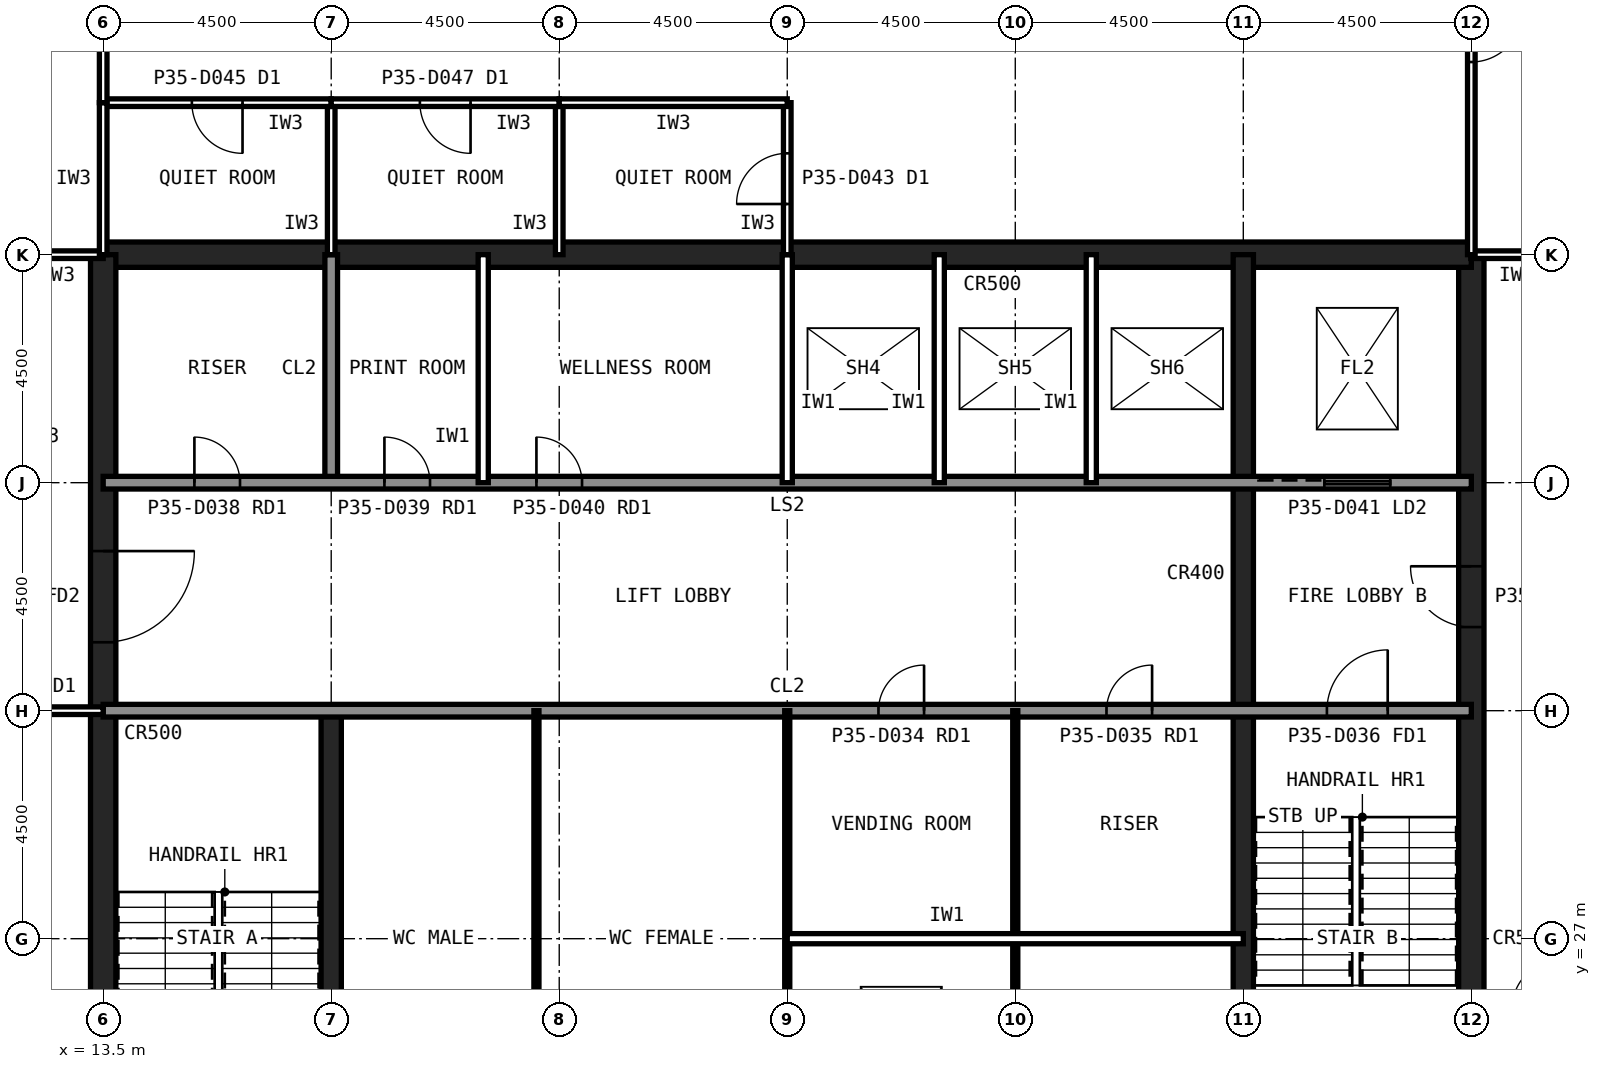
"""IFC4 building model, lengths in metres.
Left out: names, types, materials, properties, quantities, classifications, styles, units other than length and angle.
Written with IfcOpenShell. Run it as: python <this file> out.ifc"""

import sys

from ifc_helpers import new_model, si_unit, direction, frame, frame_2d, origin, place, context, subcontext, project, spatial, rectangle, extrude, element, fill, save


model = new_model("IFC4")
c1 = context("Model", 3, precision=1e-05, world=origin(), true_north=direction((0.0, 1.0)))
c2 = subcontext(c1, "Body", "Model", "MODEL_VIEW")
j1 = project(units=[si_unit("LENGTHUNIT", "METRE"), si_unit("PLANEANGLEUNIT", "RADIAN")], contexts=[c1])
p1 = place(None, origin())
s1 = spatial("IfcSite", under=j1, at=p1, CompositionType="ELEMENT")
p2 = place(p1, origin())
s2 = spatial("IfcBuilding", under=s1, at=p2, CompositionType="ELEMENT")
p3 = place(p2, frame((0.0, 0.0, 151.6)))
s3 = spatial("IfcBuildingStorey", under=s2, at=p3, CompositionType="ELEMENT", Elevation=151.6)
p4 = place(p3, frame((40.5, 13.5, 0.0), z_axis=(0.0, 0.0, 1.0), x_axis=(0.0, 1.0, 0.0)))
e1 = element("IfcWall", 1, at=p4, inside=s3, PredefinedType="SHEAR", context=c2, shape_type="SweptSolid", body=[
    extrude(rectangle(XDim=27.0, YDim=0.5, at=frame_2d((13.5, 0.0))), origin(), (0.0, 0.0, 1.0), 4.0),
])
p5 = place(p4, frame((5.85, 0.0, 0.0)))
e2 = element("IfcOpeningElement", 2, at=p5, cuts=e1, PredefinedType="OPENING", context=c2, shape_type="SweptSolid", body=[
    extrude(rectangle(XDim=1.8, YDim=2.1, at=frame_2d((0.9, 1.05))), frame((0.0, 0.26, 0.0), z_axis=(0.0, -1.0, 0.0), x_axis=(1.0, 0.0, 0.0)), (0.0, 0.0, 1.0), 0.52),
])
p6 = place(p4, frame((19.65, 0.0, 0.0)))
e3 = element("IfcOpeningElement", 3, at=p6, cuts=e1, PredefinedType="OPENING", context=c2, shape_type="SweptSolid", body=[
    extrude(rectangle(XDim=1.2, YDim=2.1, at=frame_2d((0.6, 1.05))), frame((0.0, 0.26, 0.0), z_axis=(0.0, -1.0, 0.0), x_axis=(1.0, 0.0, 0.0)), (0.0, 0.0, 1.0), 0.52),
])
p7 = place(p3, frame((40.5, 40.5, 0.0), z_axis=(0.0, 0.0, 1.0), x_axis=(-1.0, 0.0, 0.0)))
e4 = element("IfcWall", 4, at=p7, inside=s3, PredefinedType="SHEAR", context=c2, shape_type="SweptSolid", body=[
    extrude(rectangle(XDim=27.0, YDim=0.5, at=frame_2d((13.5, 0.0))), origin(), (0.0, 0.0, 1.0), 4.0),
])
p8 = place(p3, frame((13.5, 40.5, 0.0), z_axis=(0.0, 0.0, 1.0), x_axis=(0.0, -1.0, 0.0)))
e5 = element("IfcWall", 5, at=p8, inside=s3, PredefinedType="SHEAR", context=c2, shape_type="SweptSolid", body=[
    extrude(rectangle(XDim=27.0, YDim=0.5, at=frame_2d((13.5, 0.0))), origin(), (0.0, 0.0, 1.0), 4.0),
])
p9 = place(p8, frame((19.65, 0.0, 0.0)))
e6 = element("IfcOpeningElement", 6, at=p9, cuts=e5, PredefinedType="OPENING", context=c2, shape_type="SweptSolid", body=[
    extrude(rectangle(XDim=1.2, YDim=2.1, at=frame_2d((0.6, 1.05))), frame((0.0, 0.26, 0.0), z_axis=(0.0, -1.0, 0.0), x_axis=(1.0, 0.0, 0.0)), (0.0, 0.0, 1.0), 0.52),
])
p10 = place(p8, frame((5.85, 0.0, 0.0)))
e7 = element("IfcOpeningElement", 7, at=p10, cuts=e5, PredefinedType="OPENING", context=c2, shape_type="SweptSolid", body=[
    extrude(rectangle(XDim=1.8, YDim=2.1, at=frame_2d((0.9, 1.05))), frame((0.0, 0.26, 0.0), z_axis=(0.0, -1.0, 0.0), x_axis=(1.0, 0.0, 0.0)), (0.0, 0.0, 1.0), 0.52),
])
p11 = place(p3, frame((18.0, 13.5, 0.0), z_axis=(0.0, 0.0, 1.0), x_axis=(0.0, 1.0, 0.0)))
e8 = element("IfcWall", 8, at=p11, inside=s3, PredefinedType="SHEAR", context=c2, shape_type="SweptSolid", body=[
    extrude(rectangle(XDim=18.0, YDim=0.4, at=frame_2d((9.0, 0.0))), origin(), (0.0, 0.0, 1.0), 4.0),
])
p12 = place(p3, frame((18.0, 36.0, 0.0), z_axis=(0.0, 0.0, 1.0), x_axis=(0.0, 1.0, 0.0)))
e9 = element("IfcWall", 9, at=p12, inside=s3, PredefinedType="SOLIDWALL", context=c2, shape_type="SweptSolid", body=[
    extrude(rectangle(XDim=4.5, YDim=0.25, at=frame_2d((2.25, 0.0))), origin(), (0.0, 0.0, 1.0), 3.84),
])
p13 = place(p3, frame((36.0, 22.5, 0.0), z_axis=(0.0, 0.0, 1.0), x_axis=(0.0, 1.0, 0.0)))
e10 = element("IfcWall", 10, at=p13, inside=s3, PredefinedType="SHEAR", context=c2, shape_type="SweptSolid", body=[
    extrude(rectangle(XDim=18.0, YDim=0.4, at=frame_2d((9.0, 0.0))), origin(), (0.0, 0.0, 1.0), 4.0),
])
p14 = place(p3, frame((13.5, 36.0, 0.0), z_axis=(0.0, 0.0, 1.0), x_axis=(1.0, 0.0, 0.0)))
e11 = element("IfcWall", 11, at=p14, inside=s3, PredefinedType="SOLIDWALL", context=c2, shape_type="SweptSolid", body=[
    extrude(rectangle(XDim=27.0, YDim=0.25, at=frame_2d((13.5, 0.0))), origin(), (0.0, 0.0, 1.0), 3.84),
])
p15 = place(p14, frame((1.8, 0.0, 0.0)))
e12 = element("IfcOpeningElement", 12, at=p15, cuts=e11, PredefinedType="OPENING", context=c2, shape_type="SweptSolid", body=[
    extrude(rectangle(XDim=0.9, YDim=2.1, at=frame_2d((0.45, 1.05))), frame((0.0, 0.135, 0.0), z_axis=(0.0, -1.0, 0.0), x_axis=(1.0, 0.0, 0.0)), (0.0, 0.0, 1.0), 0.27),
])
p16 = place(p14, frame((5.55, 0.0, 0.0)))
e13 = element("IfcOpeningElement", 13, at=p16, cuts=e11, PredefinedType="OPENING", context=c2, shape_type="SweptSolid", body=[
    extrude(rectangle(XDim=0.9, YDim=2.1, at=frame_2d((0.45, 1.05))), frame((0.0, 0.135, 0.0), z_axis=(0.0, -1.0, 0.0), x_axis=(1.0, 0.0, 0.0)), (0.0, 0.0, 1.0), 0.27),
])
p17 = place(p14, frame((8.55, 0.0, 0.0)))
e14 = element("IfcOpeningElement", 14, at=p17, cuts=e11, PredefinedType="OPENING", context=c2, shape_type="SweptSolid", body=[
    extrude(rectangle(XDim=0.9, YDim=2.1, at=frame_2d((0.45, 1.05))), frame((0.0, 0.135, 0.0), z_axis=(0.0, -1.0, 0.0), x_axis=(1.0, 0.0, 0.0)), (0.0, 0.0, 1.0), 0.27),
])
p18 = place(p14, frame((24.1, 0.0, 0.0)))
e15 = element("IfcOpeningElement", 15, at=p18, cuts=e11, PredefinedType="OPENING", context=c2, shape_type="SweptSolid", body=[
    extrude(rectangle(XDim=1.3, YDim=2.2, at=frame_2d((0.65, 1.1))), frame((0.0, 0.135, 0.0), z_axis=(0.0, -1.0, 0.0), x_axis=(1.0, 0.0, 0.0)), (0.0, 0.0, 1.0), 0.27),
])
p19 = place(p3, frame((13.5, 31.5, 0.0), z_axis=(0.0, 0.0, 1.0), x_axis=(1.0, 0.0, 0.0)))
e16 = element("IfcWall", 16, at=p19, inside=s3, PredefinedType="SOLIDWALL", context=c2, shape_type="SweptSolid", body=[
    extrude(rectangle(XDim=27.0, YDim=0.25, at=frame_2d((13.5, 0.0))), origin(), (0.0, 0.0, 1.0), 3.84),
])
p20 = place(p19, frame((24.15, 0.0, 0.0)))
e17 = element("IfcOpeningElement", 17, at=p20, cuts=e16, PredefinedType="OPENING", context=c2, shape_type="SweptSolid", body=[
    extrude(rectangle(XDim=1.2, YDim=2.1, at=frame_2d((0.6, 1.05))), frame((0.0, 0.135, 0.0), z_axis=(0.0, -1.0, 0.0), x_axis=(1.0, 0.0, 0.0)), (0.0, 0.0, 1.0), 0.27),
])
p21 = place(p19, frame((15.3, 0.0, 0.0)))
e18 = element("IfcOpeningElement", 18, at=p21, cuts=e16, PredefinedType="OPENING", context=c2, shape_type="SweptSolid", body=[
    extrude(rectangle(XDim=0.9, YDim=2.1, at=frame_2d((0.45, 1.05))), frame((0.0, 0.135, 0.0), z_axis=(0.0, -1.0, 0.0), x_axis=(1.0, 0.0, 0.0)), (0.0, 0.0, 1.0), 0.27),
])
p22 = place(p19, frame((19.8, 0.0, 0.0)))
e19 = element("IfcOpeningElement", 19, at=p22, cuts=e16, PredefinedType="OPENING", context=c2, shape_type="SweptSolid", body=[
    extrude(rectangle(XDim=0.9, YDim=2.1, at=frame_2d((0.45, 1.05))), frame((0.0, 0.135, 0.0), z_axis=(0.0, -1.0, 0.0), x_axis=(1.0, 0.0, 0.0)), (0.0, 0.0, 1.0), 0.27),
])
for number, where, z_axis, x_axis in (
    (20, (21.0, 36.0, 0.0), (0.0, 0.0, 1.0), (0.0, 1.0, 0.0)),
    (21, (27.0, 36.0, 0.0), (0.0, 0.0, 1.0), (0.0, 1.0, 0.0)),
    (22, (30.0, 36.0, 0.0), (0.0, 0.0, 1.0), (0.0, 1.0, 0.0)),
    (23, (33.0, 36.0, 0.0), (0.0, 0.0, 1.0), (0.0, 1.0, 0.0)),
):
    element("IfcWall", number, at=place(p3, frame(where, z_axis=z_axis, x_axis=x_axis)), inside=s3, PredefinedType="PARTITIONING", context=c2, shape_type="SweptSolid", body=[
        extrude(rectangle(XDim=4.5, YDim=0.2, at=frame_2d((2.25, 0.0))), origin(), (0.0, 0.0, 1.0), 3.84),
    ])
for number, where, z_axis, x_axis in (
    (24, (22.05, 22.5, 0.0), (0.0, 0.0, 1.0), (0.0, 1.0, 0.0)),
    (25, (27.0, 22.5, 0.0), (0.0, 0.0, 1.0), (0.0, 1.0, 0.0)),
    (26, (31.5, 22.5, 0.0), (0.0, 0.0, 1.0), (0.0, 1.0, 0.0)),
):
    element("IfcWall", number, at=place(p3, frame(where, z_axis=z_axis, x_axis=x_axis)), inside=s3, PredefinedType="PLUMBINGWALL", context=c2, shape_type="SweptSolid", body=[
        extrude(rectangle(XDim=9.0, YDim=0.1, at=frame_2d((4.5, 0.0))), origin(), (0.0, 0.0, 1.0), 3.84),
    ])
p23 = place(p3, frame((27.0, 27.0, 0.0), z_axis=(0.0, 0.0, 1.0), x_axis=(1.0, 0.0, 0.0)))
e27 = element("IfcWall", 27, at=p23, inside=s3, PredefinedType="PARTITIONING", context=c2, shape_type="SweptSolid", body=[
    extrude(rectangle(XDim=9.0, YDim=0.2, at=frame_2d((4.5, 0.0))), origin(), (0.0, 0.0, 1.0), 3.84),
])
p24 = place(p3, frame((42.3, 40.5, 0.0), z_axis=(0.0, 0.0, 1.0), x_axis=(-1.0, 0.0, 0.0)))
e28 = element("IfcWall", 28, at=p24, inside=s3, PredefinedType="PARTITIONING", context=c2, shape_type="SweptSolid", body=[
    extrude(rectangle(XDim=1.81, YDim=0.15, at=frame_2d((0.905, 0.0))), origin(), (0.0, 0.0, 1.0), 2.989),
])
p25 = place(p3, frame((13.5, 40.5, 0.0), z_axis=(0.0, 0.0, 1.0), x_axis=(-1.0, 0.0, 0.0)))
e29 = element("IfcWall", 29, at=p25, inside=s3, PredefinedType="PARTITIONING", context=c2, shape_type="SweptSolid", body=[
    extrude(rectangle(XDim=1.8, YDim=0.15, at=frame_2d((0.9, 0.0))), origin(), (0.0, 0.0, 1.0), 2.989),
])
p26 = place(p3, frame((13.5, 31.5, 0.0), z_axis=(0.0, 0.0, 1.0), x_axis=(-1.0, 0.0, 0.0)))
e30 = element("IfcWall", 30, at=p26, inside=s3, PredefinedType="PARTITIONING", context=c2, shape_type="SweptSolid", body=[
    extrude(rectangle(XDim=3.6, YDim=0.15, at=frame_2d((1.8, 0.0))), origin(), (0.0, 0.0, 1.0), 2.989),
])
p27 = place(p26, frame((1.3, 0.0, 0.0)))
e31 = element("IfcOpeningElement", 31, at=p27, cuts=e30, PredefinedType="OPENING", context=c2, shape_type="SweptSolid", body=[
    extrude(rectangle(XDim=1.0, YDim=2.1, at=frame_2d((0.5, 1.05))), frame((0.0, 0.085, 0.0), z_axis=(0.0, -1.0, 0.0), x_axis=(1.0, 0.0, 0.0)), (0.0, 0.0, 1.0), 0.17),
])
p28 = place(p3, frame((18.0, 40.5, 0.0), z_axis=(0.0, 0.0, 1.0), x_axis=(0.0, 1.0, 0.0)))
e32 = element("IfcWall", 32, at=p28, inside=s3, PredefinedType="PARTITIONING", context=c2, shape_type="SweptSolid", body=[
    extrude(rectangle(XDim=3.0, YDim=0.15, at=frame_2d((1.5, 0.0))), origin(), (0.0, 0.0, 1.0), 2.989),
])
p29 = place(p3, frame((18.0, 43.5, 0.0), z_axis=(0.0, 0.0, 1.0), x_axis=(-1.0, 0.0, 0.0)))
e33 = element("IfcWall", 33, at=p29, inside=s3, PredefinedType="PARTITIONING", context=c2, shape_type="SweptSolid", body=[
    extrude(rectangle(XDim=4.5, YDim=0.15, at=frame_2d((2.25, 0.0))), origin(), (0.0, 0.0, 1.0), 3.84),
])
p30 = place(p29, frame((1.75, 0.0, 0.0)))
e34 = element("IfcOpeningElement", 34, at=p30, cuts=e33, PredefinedType="OPENING", context=c2, shape_type="SweptSolid", body=[
    extrude(rectangle(XDim=1.0, YDim=2.1, at=frame_2d((0.5, 1.05))), frame((0.0, 0.085, 0.0), z_axis=(0.0, -1.0, 0.0), x_axis=(1.0, 0.0, 0.0)), (0.0, 0.0, 1.0), 0.17),
])
for number, where, z_axis, x_axis in (
    (35, (13.5, 43.5, 0.0), (0.0, 0.0, 1.0), (0.0, -1.0, 0.0)),
    (36, (22.5, 40.5, 0.0), (0.0, 0.0, 1.0), (0.0, 1.0, 0.0)),
):
    element("IfcWall", number, at=place(p3, frame(where, z_axis=z_axis, x_axis=x_axis)), inside=s3, PredefinedType="PARTITIONING", context=c2, shape_type="SweptSolid", body=[
        extrude(rectangle(XDim=3.0, YDim=0.15, at=frame_2d((1.5, 0.0))), origin(), (0.0, 0.0, 1.0), 2.989),
    ])
p31 = place(p3, frame((22.5, 43.5, 0.0), z_axis=(0.0, 0.0, 1.0), x_axis=(-1.0, 0.0, 0.0)))
e37 = element("IfcWall", 37, at=p31, inside=s3, PredefinedType="PARTITIONING", context=c2, shape_type="SweptSolid", body=[
    extrude(rectangle(XDim=4.5, YDim=0.15, at=frame_2d((2.25, 0.0))), origin(), (0.0, 0.0, 1.0), 3.84),
])
p32 = place(p31, frame((1.75, 0.0, 0.0)))
e38 = element("IfcOpeningElement", 38, at=p32, cuts=e37, PredefinedType="OPENING", context=c2, shape_type="SweptSolid", body=[
    extrude(rectangle(XDim=1.0, YDim=2.1, at=frame_2d((0.5, 1.05))), frame((0.0, 0.085, 0.0), z_axis=(0.0, -1.0, 0.0), x_axis=(1.0, 0.0, 0.0)), (0.0, 0.0, 1.0), 0.17),
])
p33 = place(p3, frame((27.0, 40.5, 0.0), z_axis=(0.0, 0.0, 1.0), x_axis=(0.0, 1.0, 0.0)))
e39 = element("IfcWall", 39, at=p33, inside=s3, PredefinedType="PARTITIONING", context=c2, shape_type="SweptSolid", body=[
    extrude(rectangle(XDim=3.0, YDim=0.15, at=frame_2d((1.5, 0.0))), origin(), (0.0, 0.0, 1.0), 2.989),
])
p34 = place(p33, frame((1.0, 0.0, 0.0)))
e40 = element("IfcOpeningElement", 40, at=p34, cuts=e39, PredefinedType="OPENING", context=c2, shape_type="SweptSolid", body=[
    extrude(rectangle(XDim=1.0, YDim=2.1, at=frame_2d((0.5, 1.05))), frame((0.0, 0.085, 0.0), z_axis=(0.0, -1.0, 0.0), x_axis=(1.0, 0.0, 0.0)), (0.0, 0.0, 1.0), 0.17),
])
p35 = place(p3, frame((27.0, 43.5, 0.0), z_axis=(0.0, 0.0, 1.0), x_axis=(-1.0, 0.0, 0.0)))
e41 = element("IfcWall", 41, at=p35, inside=s3, PredefinedType="PARTITIONING", context=c2, shape_type="SweptSolid", body=[
    extrude(rectangle(XDim=4.5, YDim=0.15, at=frame_2d((2.25, 0.0))), origin(), (0.0, 0.0, 1.0), 3.84),
])
p36 = place(p3, frame((13.5, 43.5, 0.0), z_axis=(0.0, 0.0, 1.0), x_axis=(0.0, 1.0, 0.0)))
e42 = element("IfcWall", 42, at=p36, inside=s3, PredefinedType="PARTITIONING", context=c2, shape_type="SweptSolid", body=[
    extrude(rectangle(XDim=10.08, YDim=0.15, at=frame_2d((5.04, 0.0))), origin(), (0.0, 0.0, 1.0), 2.989),
])
p37 = place(p36, frame((4.54, 0.0, 0.0)))
e43 = element("IfcOpeningElement", 43, at=p37, cuts=e42, PredefinedType="OPENING", context=c2, shape_type="SweptSolid", body=[
    extrude(rectangle(XDim=1.0, YDim=2.1, at=frame_2d((0.5, 1.05))), frame((0.0, 0.085, 0.0), z_axis=(0.0, -1.0, 0.0), x_axis=(1.0, 0.0, 0.0)), (0.0, 0.0, 1.0), 0.17),
])
p38 = place(p3, frame((40.5, 49.105, 0.0), z_axis=(0.0, 0.0, 1.0), x_axis=(0.0, -1.0, 0.0)))
e44 = element("IfcWall", 44, at=p38, inside=s3, PredefinedType="PARTITIONING", context=c2, shape_type="SweptSolid", body=[
    extrude(rectangle(XDim=8.605, YDim=0.15, at=frame_2d((4.302, 0.0))), origin(), (0.0, 0.0, 1.0), 2.989),
])
p39 = place(p38, frame((3.802, 0.0, 0.0)))
e45 = element("IfcOpeningElement", 45, at=p39, cuts=e44, PredefinedType="OPENING", context=c2, shape_type="SweptSolid", body=[
    extrude(rectangle(XDim=1.0, YDim=2.1, at=frame_2d((0.5, 1.05))), frame((0.0, 0.085, 0.0), z_axis=(0.0, -1.0, 0.0), x_axis=(1.0, 0.0, 0.0)), (0.0, 0.0, 1.0), 0.17),
])
p40 = place(p10, origin())
e46 = element("IfcDoor", 46, at=p40, inside=s3, OperationType="SINGLE_SWING_LEFT", PredefinedType="DOOR", context=c2, shape_type="SweptSolid", body=[
    extrude(rectangle(XDim=1.8, YDim=2.1, at=frame_2d((0.9, 1.05))), frame((0.0, 0.025, 0.0), z_axis=(0.0, -1.0, 0.0), x_axis=(1.0, 0.0, 0.0)), (0.0, 0.0, 1.0), 0.05),
])
fill(e7, e46)
p41 = place(p6, origin())
e47 = element("IfcDoor", 47, at=p41, inside=s3, OperationType="SINGLE_SWING_RIGHT", PredefinedType="DOOR", context=c2, shape_type="SweptSolid", body=[
    extrude(rectangle(XDim=1.2, YDim=2.1, at=frame_2d((0.6, 1.05))), frame((0.0, 0.025, 0.0), z_axis=(0.0, -1.0, 0.0), x_axis=(1.0, 0.0, 0.0)), (0.0, 0.0, 1.0), 0.05),
])
fill(e3, e47)
p42 = place(p20, origin())
e48 = element("IfcDoor", 48, at=p42, inside=s3, OperationType="SINGLE_SWING_RIGHT", PredefinedType="DOOR", context=c2, shape_type="SweptSolid", body=[
    extrude(rectangle(XDim=1.2, YDim=2.1, at=frame_2d((0.6, 1.05))), frame((0.0, 0.025, 0.0), z_axis=(0.0, -1.0, 0.0), x_axis=(1.0, 0.0, 0.0)), (0.0, 0.0, 1.0), 0.05),
])
fill(e17, e48)
p43 = place(p21, origin())
e49 = element("IfcDoor", 49, at=p43, inside=s3, OperationType="SINGLE_SWING_RIGHT", PredefinedType="DOOR", context=c2, shape_type="SweptSolid", body=[
    extrude(rectangle(XDim=0.9, YDim=2.1, at=frame_2d((0.45, 1.05))), frame((0.0, 0.025, 0.0), z_axis=(0.0, -1.0, 0.0), x_axis=(1.0, 0.0, 0.0)), (0.0, 0.0, 1.0), 0.05),
])
fill(e18, e49)
p44 = place(p22, origin())
e50 = element("IfcDoor", 50, at=p44, inside=s3, OperationType="SINGLE_SWING_RIGHT", PredefinedType="DOOR", context=c2, shape_type="SweptSolid", body=[
    extrude(rectangle(XDim=0.9, YDim=2.1, at=frame_2d((0.45, 1.05))), frame((0.0, 0.025, 0.0), z_axis=(0.0, -1.0, 0.0), x_axis=(1.0, 0.0, 0.0)), (0.0, 0.0, 1.0), 0.05),
])
fill(e19, e50)
p45 = place(p15, origin())
e51 = element("IfcDoor", 51, at=p45, inside=s3, OperationType="SINGLE_SWING_LEFT", PredefinedType="DOOR", context=c2, shape_type="SweptSolid", body=[
    extrude(rectangle(XDim=0.9, YDim=2.1, at=frame_2d((0.45, 1.05))), frame((0.0, 0.025, 0.0), z_axis=(0.0, -1.0, 0.0), x_axis=(1.0, 0.0, 0.0)), (0.0, 0.0, 1.0), 0.05),
])
fill(e12, e51)
p46 = place(p16, origin())
e52 = element("IfcDoor", 52, at=p46, inside=s3, OperationType="SINGLE_SWING_LEFT", PredefinedType="DOOR", context=c2, shape_type="SweptSolid", body=[
    extrude(rectangle(XDim=0.9, YDim=2.1, at=frame_2d((0.45, 1.05))), frame((0.0, 0.025, 0.0), z_axis=(0.0, -1.0, 0.0), x_axis=(1.0, 0.0, 0.0)), (0.0, 0.0, 1.0), 0.05),
])
fill(e13, e52)
p47 = place(p17, origin())
e53 = element("IfcDoor", 53, at=p47, inside=s3, OperationType="SINGLE_SWING_LEFT", PredefinedType="DOOR", context=c2, shape_type="SweptSolid", body=[
    extrude(rectangle(XDim=0.9, YDim=2.1, at=frame_2d((0.45, 1.05))), frame((0.0, 0.025, 0.0), z_axis=(0.0, -1.0, 0.0), x_axis=(1.0, 0.0, 0.0)), (0.0, 0.0, 1.0), 0.05),
])
fill(e14, e53)
p48 = place(p18, origin())
e54 = element("IfcDoor", 54, at=p48, inside=s3, OperationType="SLIDING_TO_LEFT", PredefinedType="DOOR", context=c2, shape_type="SweptSolid", body=[
    extrude(rectangle(XDim=1.3, YDim=2.2, at=frame_2d((0.65, 1.1))), frame((0.0, 0.025, 0.0), z_axis=(0.0, -1.0, 0.0), x_axis=(1.0, 0.0, 0.0)), (0.0, 0.0, 1.0), 0.05),
])
fill(e15, e54)
p49 = place(p30, origin())
e55 = element("IfcDoor", 55, at=p49, inside=s3, OperationType="SINGLE_SWING_LEFT", PredefinedType="DOOR", context=c2, shape_type="SweptSolid", body=[
    extrude(rectangle(XDim=1.0, YDim=2.1, at=frame_2d((0.5, 1.05))), frame((0.0, 0.025, 0.0), z_axis=(0.0, -1.0, 0.0), x_axis=(1.0, 0.0, 0.0)), (0.0, 0.0, 1.0), 0.05),
])
fill(e34, e55)
p50 = place(p32, origin())
e56 = element("IfcDoor", 56, at=p50, inside=s3, OperationType="SINGLE_SWING_LEFT", PredefinedType="DOOR", context=c2, shape_type="SweptSolid", body=[
    extrude(rectangle(XDim=1.0, YDim=2.1, at=frame_2d((0.5, 1.05))), frame((0.0, 0.025, 0.0), z_axis=(0.0, -1.0, 0.0), x_axis=(1.0, 0.0, 0.0)), (0.0, 0.0, 1.0), 0.05),
])
fill(e38, e56)
p51 = place(p34, origin())
e57 = element("IfcDoor", 57, at=p51, inside=s3, OperationType="SINGLE_SWING_LEFT", PredefinedType="DOOR", context=c2, shape_type="SweptSolid", body=[
    extrude(rectangle(XDim=1.0, YDim=2.1, at=frame_2d((0.5, 1.05))), frame((0.0, 0.025, 0.0), z_axis=(0.0, -1.0, 0.0), x_axis=(1.0, 0.0, 0.0)), (0.0, 0.0, 1.0), 0.05),
])
fill(e40, e57)
p52 = place(p39, origin())
e58 = element("IfcDoor", 58, at=p52, inside=s3, OperationType="SINGLE_SWING_LEFT", PredefinedType="DOOR", context=c2, shape_type="SweptSolid", body=[
    extrude(rectangle(XDim=1.0, YDim=2.1, at=frame_2d((0.5, 1.05))), frame((0.0, 0.025, 0.0), z_axis=(0.0, -1.0, 0.0), x_axis=(1.0, 0.0, 0.0)), (0.0, 0.0, 1.0), 0.05),
])
fill(e45, e58)
save(model, sys.argv[1])
